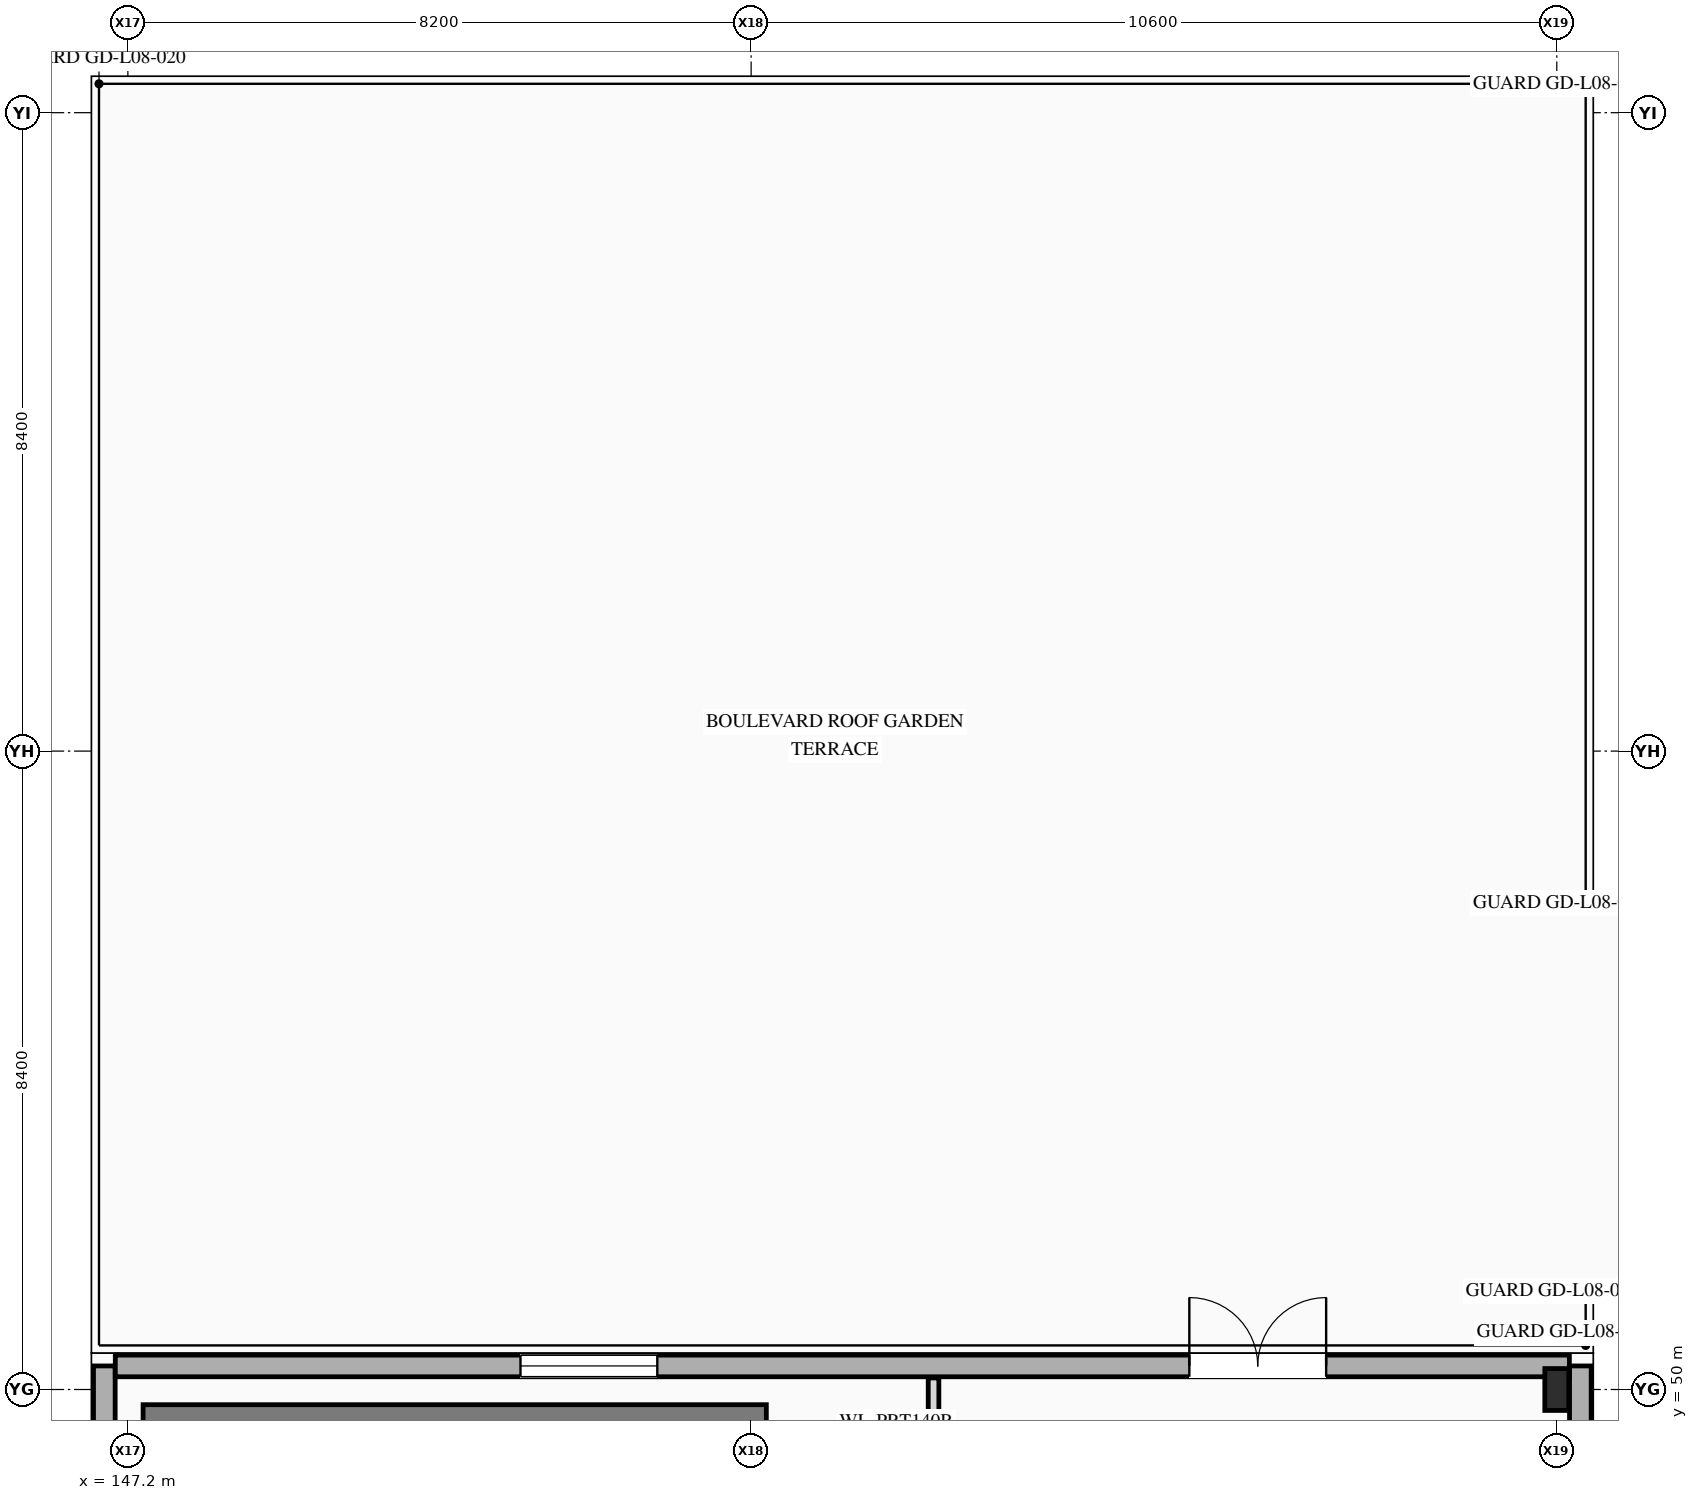
"""IFC4 building model, lengths in metres.
Left out: names, types, materials, properties, quantities, classifications, styles, units other than length and angle.
Written with IfcOpenShell. Run it as: python <this file> out.ifc"""

import sys

from ifc_helpers import new_model, si_unit, direction, frame, frame_2d, origin, origin_2d, place, context, subcontext, project, spatial, rectangle, i_section, extrude, element, fill, save


model = new_model("IFC4")
c1 = context("Model", 3, precision=1e-05, world=origin(), true_north=direction((0.0, 1.0)))
c2 = subcontext(c1, "Body", "Model", "MODEL_VIEW")
j1 = project(units=[si_unit("LENGTHUNIT", "METRE"), si_unit("PLANEANGLEUNIT", "RADIAN")], contexts=[c1])
p1 = place(None, origin())
s1 = spatial("IfcSite", under=j1, at=p1, CompositionType="ELEMENT")
p2 = place(p1, origin())
s2 = spatial("IfcBuilding", under=s1, at=p2, CompositionType="ELEMENT")
p3 = place(p2, frame((0.0, 0.0, 34.1)))
s3 = spatial("IfcBuildingStorey", under=s2, at=p3, CompositionType="ELEMENT", Elevation=34.1)
p4 = place(p3, frame((166.0, 50.0, 0.0), z_axis=(0.0, 0.0, 1.0), x_axis=(1.0, 0.0, 0.0)))
e1 = element("IfcColumn", 1, at=p4, inside=s3, PredefinedType="COLUMN", context=c2, shape_type="SweptSolid", body=[
    extrude(i_section(OverallWidth=0.315, OverallDepth=0.551, WebThickness=0.015, FlangeThickness=0.024, at=origin_2d()), origin(), (0.0, 0.0, 1.0), 3.5),
])
p5 = place(p3, frame((166.31, 47.86, 0.0), z_axis=(0.0, 0.0, 1.0), x_axis=(0.0, 1.0, 0.0)))
e2 = element("IfcWall", 2, at=p5, inside=s3, PredefinedType="STANDARD", context=c2, shape_type="SweptSolid", body=[
    extrude(rectangle(XDim=2.45, YDim=0.285, at=frame_2d((1.225, 0.0))), origin(), (0.0, 0.0, 1.0), 3.5),
])
p6 = place(p3, frame((146.89, 41.6, 0.0), z_axis=(0.0, 0.0, 1.0), x_axis=(0.0, 1.0, 0.0)))
e3 = element("IfcWall", 3, at=p6, inside=s3, PredefinedType="STANDARD", context=c2, shape_type="SweptSolid", body=[
    extrude(rectangle(XDim=8.71, YDim=0.285, at=frame_2d((4.355, 0.0))), origin(), (0.0, 0.0, 1.0), 3.5),
])
p7 = place(p3, frame((166.166, 50.31, 0.0), z_axis=(0.0, 0.0, 1.0), x_axis=(-1.0, 0.0, 0.0)))
e4 = element("IfcWall", 4, at=p7, inside=s3, PredefinedType="STANDARD", context=c2, shape_type="SweptSolid", body=[
    extrude(rectangle(XDim=19.131, YDim=0.285, at=frame_2d((9.565, 0.0))), origin(), (0.0, 0.0, 1.0), 3.5),
])
p8 = place(p7, frame((3.2, 0.0, 0.0)))
e5 = element("IfcOpeningElement", 5, at=p8, cuts=e4, PredefinedType="OPENING", context=c2, shape_type="SweptSolid", body=[
    extrude(rectangle(XDim=1.8, YDim=2.3, at=frame_2d((0.9, 1.15))), frame((0.0, 0.152, 0.0), z_axis=(0.0, -1.0, 0.0), x_axis=(1.0, 0.0, 0.0)), (0.0, 0.0, 1.0), 0.305),
])
p9 = place(p7, frame((12.0, 0.0, 0.88)))
e6 = element("IfcOpeningElement", 6, at=p9, cuts=e4, PredefinedType="OPENING", context=c2, shape_type="SweptSolid", body=[
    extrude(rectangle(XDim=1.8, YDim=1.8, at=frame_2d((0.9, 0.9))), frame((0.0, 0.152, 0.0), z_axis=(0.0, -1.0, 0.0), x_axis=(1.0, 0.0, 0.0)), (0.0, 0.0, 1.0), 0.305),
])
p10 = place(p3, frame((155.6, 49.6, 0.0), z_axis=(0.0, 0.0, 1.0), x_axis=(-1.0, 0.0, 0.0)))
e7 = element("IfcWall", 7, at=p10, inside=s3, PredefinedType="SHEAR", context=c2, shape_type="SweptSolid", body=[
    extrude(rectangle(XDim=8.2, YDim=0.4, at=frame_2d((4.1, 0.0))), origin(), (0.0, 0.0, 1.0), 3.5),
])
p11 = place(p3, frame((157.8, 44.17, 0.0), z_axis=(0.0, 0.0, 1.0), x_axis=(0.0, 1.0, 0.0)))
e8 = element("IfcWall", 8, at=p11, inside=s3, PredefinedType="PARTITIONING", context=c2, shape_type="SweptSolid", body=[
    extrude(rectangle(XDim=5.983, YDim=0.14, at=frame_2d((2.991, 0.0))), origin(), (0.0, 0.0, 1.0), 2.743),
])
p12 = place(p11, frame((2.501, 0.0, 0.0)))
e9 = element("IfcOpeningElement", 9, at=p12, cuts=e8, PredefinedType="OPENING", context=c2, shape_type="SweptSolid", body=[
    extrude(rectangle(XDim=0.98, YDim=2.2, at=frame_2d((0.49, 1.1))), frame((0.0, 0.08, 0.0), z_axis=(0.0, -1.0, 0.0), x_axis=(1.0, 0.0, 0.0)), (0.0, 0.0, 1.0), 0.16),
])
p13 = place(p8, frame((1.8, 0.0, 0.0), z_axis=(0.0, 0.0, 1.0), x_axis=(-1.0, 0.0, 0.0)))
e10 = element("IfcDoor", 10, at=p13, inside=s3, OperationType="DOUBLE_DOOR_SINGLE_SWING", PredefinedType="DOOR", context=c2, shape_type="SweptSolid", body=[
    extrude(rectangle(XDim=1.8, YDim=2.3, at=frame_2d((0.9, 1.15))), frame((0.0, 0.025, 0.0), z_axis=(0.0, -1.0, 0.0), x_axis=(1.0, 0.0, 0.0)), (0.0, 0.0, 1.0), 0.05),
])
fill(e5, e10)
p14 = place(p9, origin())
e11 = element("IfcWindow", 11, at=p14, inside=s3, PartitioningType="SINGLE_PANEL", PredefinedType="WINDOW", context=c2, shape_type="SweptSolid", body=[
    extrude(rectangle(XDim=1.8, YDim=1.8, at=frame_2d((0.9, 0.9))), frame((0.0, 0.03, 0.0), z_axis=(0.0, -1.0, 0.0), x_axis=(1.0, 0.0, 0.0)), (0.0, 0.0, 1.0), 0.06),
])
fill(e6, e11)
save(model, sys.argv[1])
